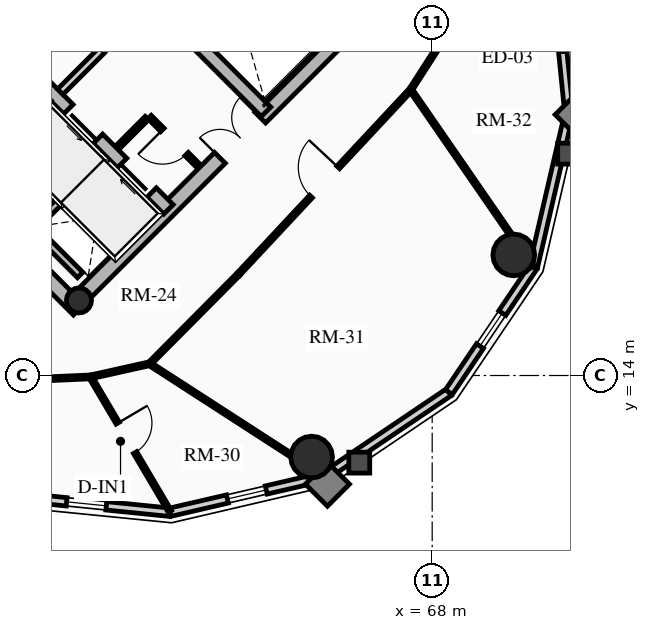
"""IFC4 building model, lengths in metres.
Left out: names, types, materials, properties, quantities, classifications, styles, units other than length and angle.
Written with IfcOpenShell. Run it as: python <this file> out.ifc"""

import sys

from ifc_helpers import new_model, si_unit, direction, frame, frame_2d, origin, origin_2d, place, context, subcontext, project, spatial, rectangle, circle, hollow_circle, extrude, source, transform, mapped, element, fill, save


model = new_model("IFC4")
c1 = context("Model", 3, precision=1e-05, world=origin(), true_north=direction((0.0, 1.0)))
c2 = subcontext(c1, "Body", "Model", "MODEL_VIEW")
j1 = project(units=[si_unit("LENGTHUNIT", "METRE"), si_unit("PLANEANGLEUNIT", "RADIAN")], contexts=[c1])
p1 = place(None, origin())
s1 = spatial("IfcSite", under=j1, at=p1, CompositionType="ELEMENT")
p2 = place(p1, origin())
s2 = spatial("IfcBuilding", under=s1, at=p2, CompositionType="ELEMENT")
p3 = place(p2, frame((0.0, 0.0, 232.45)))
s3 = spatial("IfcBuildingStorey", under=s2, at=p3, CompositionType="ELEMENT", Elevation=232.45)
p4 = place(p3, frame((58.702, 15.732, 0.0), z_axis=(0.0, 0.0, 1.0), x_axis=(-0.707106781187, 0.707106781187, 0.0)))
e1 = element("IfcWall", 1, at=p4, inside=s3, PredefinedType="SHEAR", context=c2, shape_type="SweptSolid", body=[
    extrude(rectangle(XDim=14.1, YDim=0.4, at=frame_2d((7.05, 0.0))), origin(), (0.0, 0.0, 1.0), 3.2),
])
p5 = place(p3, frame((58.561, 15.873, 0.0), z_axis=(0.0, 0.0, 1.0), x_axis=(0.707106781187, 0.707106781187, 0.0)))
e2 = element("IfcWall", 2, at=p5, inside=s3, PredefinedType="SHEAR", context=c2, shape_type="SweptSolid", body=[
    extrude(rectangle(XDim=10.7, YDim=0.4, at=frame_2d((5.35, 0.0))), origin(), (0.0, 0.0, 1.0), 3.2),
])
m1 = source(origin(), c2, "Body", "SweptSolid", [
    extrude(rectangle(XDim=1.5, YDim=2.02, at=frame_2d((0.75, 1.01))), frame((0.0, 0.21, 0.0), z_axis=(0.0, -1.0, 0.0), x_axis=(1.0, 0.0, 0.0)), (0.0, 0.0, 1.0), 0.42),
])
p6 = place(p5, frame((5.45, 0.0, 0.0)))
e3 = element("IfcOpeningElement", 3, at=p6, cuts=e2, PredefinedType="OPENING", context=c2, shape_type="MappedRepresentation", body=[
    mapped(m1, transform((0.0, 0.0, 0.0), x_axis=(1.0, 0.0, 0.0), y_axis=(0.0, 1.0, 0.0), z_axis=(0.0, 0.0, 1.0), scale=1.0)),
])
p7 = place(p3, frame((61.06, 18.373, 0.0), z_axis=(0.0, 0.0, 1.0), x_axis=(-0.707106781187, 0.707106781187, 0.0)))
e4 = element("IfcWall", 4, at=p7, inside=s3, PredefinedType="SHEAR", context=c2, shape_type="SweptSolid", body=[
    extrude(rectangle(XDim=13.7, YDim=0.35, at=frame_2d((6.85, 0.0))), origin(), (0.0, 0.0, 1.0), 3.2),
])
m2 = source(origin(), c2, "Body", "SweptSolid", [
    extrude(rectangle(XDim=1.1, YDim=2.015, at=frame_2d((0.55, 1.007))), frame((0.0, 0.185, 0.0), z_axis=(0.0, -1.0, 0.0), x_axis=(1.0, 0.0, 0.0)), (0.0, 0.0, 1.0), 0.37),
])
p8 = place(p7, frame((4.85, 0.0, 0.0)))
e5 = element("IfcOpeningElement", 5, at=p8, cuts=e4, PredefinedType="OPENING", context=c2, shape_type="MappedRepresentation", body=[
    mapped(m2, transform((0.0, 0.0, 0.0), x_axis=(1.0, 0.0, 0.0), y_axis=(0.0, 1.0, 0.0), z_axis=(0.0, 0.0, 1.0), scale=1.0)),
])
p9 = place(p7, frame((0.625, 0.0, 0.0)))
e6 = element("IfcOpeningElement", 6, at=p9, cuts=e4, PredefinedType="OPENING", context=c2, shape_type="MappedRepresentation", body=[
    mapped(m2, transform((0.0, 0.0, 0.0), x_axis=(1.0, 0.0, 0.0), y_axis=(0.0, 1.0, 0.0), z_axis=(0.0, 0.0, 1.0), scale=1.0)),
])
p10 = place(p7, frame((2.625, 0.0, 0.0)))
e7 = element("IfcOpeningElement", 7, at=p10, cuts=e4, PredefinedType="OPENING", context=c2, shape_type="MappedRepresentation", body=[
    mapped(m2, transform((0.0, 0.0, 0.0), x_axis=(1.0, 0.0, 0.0), y_axis=(0.0, 1.0, 0.0), z_axis=(0.0, 0.0, 1.0), scale=1.0)),
])
m3 = source(origin(), c2, "Body", "SweptSolid", [
    extrude(rectangle(XDim=1.15, YDim=2.02, at=frame_2d((0.575, 1.01))), frame((0.0, 0.185, 0.0), z_axis=(0.0, -1.0, 0.0), x_axis=(1.0, 0.0, 0.0)), (0.0, 0.0, 1.0), 0.37),
])
p11 = place(p7, frame((7.27, 0.0, 0.0)))
e8 = element("IfcOpeningElement", 8, at=p11, cuts=e4, PredefinedType="OPENING", context=c2, shape_type="MappedRepresentation", body=[
    mapped(m3, transform((0.0, 0.0, 0.0), x_axis=(1.0, 0.0, 0.0), y_axis=(0.0, 1.0, 0.0), z_axis=(0.0, 0.0, 1.0), scale=1.0)),
])
p12 = place(p3, frame((63.627, 20.94, 0.0), z_axis=(0.0, 0.0, 1.0), x_axis=(-0.707119496762, 0.707094065383, 0.0)))
e9 = element("IfcWall", 9, at=p12, inside=s3, PredefinedType="SHEAR", context=c2, shape_type="SweptSolid", body=[
    extrude(rectangle(XDim=9.6, YDim=0.35, at=frame_2d((4.8, 0.0))), origin(), (0.0, 0.0, 1.0), 3.2),
])
p13 = place(p12, frame((5.28, 0.0, 0.0)))
e10 = element("IfcOpeningElement", 10, at=p13, cuts=e9, PredefinedType="OPENING", context=c2, shape_type="MappedRepresentation", body=[
    mapped(m3, transform((0.0, 0.0, 0.0), x_axis=(1.0, 0.0, 0.0), y_axis=(0.0, 1.0, 0.0), z_axis=(0.0, 0.0, 1.0), scale=1.0)),
])
p14 = place(p3, frame((58.706, 15.976, 0.0), z_axis=(0.0, 0.0, 1.0), x_axis=(0.707106781187, 0.707106781187, 0.0)))
e11 = element("IfcColumn", 11, at=p14, inside=s3, PredefinedType="COLUMN", context=c2, shape_type="SweptSolid", body=[
    extrude(hollow_circle(Radius=0.33, WallThickness=0.025, at=origin_2d()), origin(), (0.0, 0.0, 1.0), 3.2),
])
for number, where, z_axis, x_axis in (
    (12, (64.827, 11.854, 0.0), (0.0, 0.0, 1.0), (1.0, 0.0, 0.0)),
    (13, (70.146, 17.173, 0.0), (0.0, 0.0, 1.0), (1.0, 0.0, 0.0)),
):
    element("IfcColumn", number, at=place(p3, frame(where, z_axis=z_axis, x_axis=x_axis)), inside=s3, PredefinedType="USERDEFINED", context=c2, shape_type="SweptSolid", body=[
        extrude(circle(Radius=0.55, at=origin_2d()), origin(), (0.0, 0.0, 1.0), 3.2),
    ])
p15 = place(p3, frame((61.1, 10.401, 0.0), z_axis=(0.0, 0.0, 1.0), x_axis=(-0.994929930991, 0.100570534541, 0.0)))
e14 = element("IfcWall", 14, at=p15, inside=s3, PredefinedType="SOLIDWALL", context=c2, shape_type="SweptSolid", body=[
    extrude(rectangle(XDim=4.418, YDim=0.22, at=frame_2d((2.209, 0.0))), origin(), (0.0, 0.0, 1.0), 2.402),
])
m4 = source(origin(), c2, "Body", "SweptSolid", [
    extrude(rectangle(XDim=1.05, YDim=1.3, at=frame_2d((0.525, 0.65))), frame((0.0, 0.12, 0.0), z_axis=(0.0, -1.0, 0.0), x_axis=(1.0, 0.0, 0.0)), (0.0, 0.0, 1.0), 0.24),
])
p16 = place(p15, frame((1.684, 0.0, 0.65)))
e15 = element("IfcOpeningElement", 15, at=p16, cuts=e14, PredefinedType="OPENING", context=c2, shape_type="MappedRepresentation", body=[
    mapped(m4, transform((0.0, 0.0, 0.0), x_axis=(1.0, 0.0, 0.0), y_axis=(0.0, 1.0, 0.0), z_axis=(0.0, 0.0, 1.0), scale=1.0)),
])
p17 = place(p3, frame((65.144, 11.337, 0.0), z_axis=(0.0, 0.0, 1.0), x_axis=(-0.974249228678, -0.225473813158, 0.0)))
e16 = element("IfcWall", 16, at=p17, inside=s3, PredefinedType="SOLIDWALL", context=c2, shape_type="SweptSolid", body=[
    extrude(rectangle(XDim=4.15, YDim=0.22, at=frame_2d((2.075, 0.0))), origin(), (0.0, 0.0, 1.0), 2.402),
])
p18 = place(p17, frame((1.55, 0.0, 0.65)))
e17 = element("IfcOpeningElement", 17, at=p18, cuts=e16, PredefinedType="OPENING", context=c2, shape_type="MappedRepresentation", body=[
    mapped(m4, transform((0.0, 0.0, 0.0), x_axis=(1.0, 0.0, 0.0), y_axis=(0.0, 1.0, 0.0), z_axis=(0.0, 0.0, 1.0), scale=1.0)),
])
p19 = place(p3, frame((68.439, 13.561, 0.0), z_axis=(0.0, 0.0, 1.0), x_axis=(-0.828833723692, -0.559495003079, 0.0)))
e18 = element("IfcWall", 18, at=p19, inside=s3, PredefinedType="SOLIDWALL", context=c2, shape_type="SweptSolid", body=[
    extrude(rectangle(XDim=3.976, YDim=0.22, at=frame_2d((1.988, 0.0))), origin(), (0.0, 0.0, 1.0), 2.402),
])
p20 = place(p3, frame((70.663, 16.856, 0.0), z_axis=(0.0, 0.0, 1.0), x_axis=(-0.559495003079, -0.828833723692, 0.0)))
e19 = element("IfcWall", 19, at=p20, inside=s3, PredefinedType="SOLIDWALL", context=c2, shape_type="SweptSolid", body=[
    extrude(rectangle(XDim=3.976, YDim=0.22, at=frame_2d((1.988, 0.0))), origin(), (0.0, 0.0, 1.0), 2.402),
])
p21 = place(p20, frame((1.463, 0.0, 0.65)))
e20 = element("IfcOpeningElement", 20, at=p21, cuts=e19, PredefinedType="OPENING", context=c2, shape_type="MappedRepresentation", body=[
    mapped(m4, transform((0.0, 0.0, 0.0), x_axis=(1.0, 0.0, 0.0), y_axis=(0.0, 1.0, 0.0), z_axis=(0.0, 0.0, 1.0), scale=1.0)),
])
p22 = place(p3, frame((71.599, 20.9, 0.0), z_axis=(0.0, 0.0, 1.0), x_axis=(-0.225473813158, -0.974249228678, 0.0)))
e21 = element("IfcWall", 21, at=p22, inside=s3, PredefinedType="SOLIDWALL", context=c2, shape_type="SweptSolid", body=[
    extrude(rectangle(XDim=4.15, YDim=0.22, at=frame_2d((2.075, 0.0))), origin(), (0.0, 0.0, 1.0), 2.402),
])
p23 = place(p3, frame((71.155, 25.295, 0.0), z_axis=(0.0, 0.0, 1.0), x_axis=(0.100570534541, -0.994929930991, 0.0)))
e22 = element("IfcWall", 22, at=p23, inside=s3, PredefinedType="SOLIDWALL", context=c2, shape_type="SweptSolid", body=[
    extrude(rectangle(XDim=4.418, YDim=0.22, at=frame_2d((2.209, 0.0))), origin(), (0.0, 0.0, 1.0), 2.402),
])
m5 = source(origin(), c2, "Body", "SweptSolid", [
    extrude(rectangle(XDim=1.15, YDim=2.005, at=frame_2d((0.575, 1.002))), frame((0.0, 0.12, 0.0), z_axis=(0.0, -1.0, 0.0), x_axis=(1.0, 0.0, 0.0)), (0.0, 0.0, 1.0), 0.24),
])
p24 = place(p23, frame((1.634, 0.0, 0.0)))
e23 = element("IfcOpeningElement", 23, at=p24, cuts=e22, PredefinedType="OPENING", context=c2, shape_type="MappedRepresentation", body=[
    mapped(m5, transform((0.0, 0.0, 0.0), x_axis=(1.0, 0.0, 0.0), y_axis=(0.0, 1.0, 0.0), z_axis=(0.0, 0.0, 1.0), scale=1.0)),
])
p25 = place(p3, frame((55.888, 19.069, 0.0), z_axis=(0.0, 0.0, 1.0), x_axis=(0.707106781187, 0.707106781187, 0.0)))
e24 = element("IfcWall", 24, at=p25, inside=s3, PredefinedType="SHEAR", context=c2, shape_type="SweptSolid", body=[
    extrude(rectangle(XDim=2.97, YDim=0.2, at=frame_2d((1.485, 0.0))), origin(), (0.0, 0.0, 1.0), 3.2),
])
p26 = place(p3, frame((57.284, 17.673, 0.0), z_axis=(0.0, 0.0, 1.0), x_axis=(0.707147878904, 0.70706568108, 0.0)))
e25 = element("IfcWall", 25, at=p26, inside=s3, PredefinedType="SHEAR", context=c2, shape_type="SweptSolid", body=[
    extrude(rectangle(XDim=2.97, YDim=0.2, at=frame_2d((1.485, 0.0))), origin(), (0.0, 0.0, 1.0), 3.2),
])
p27 = place(p3, frame((58.737, 16.644, 0.0), z_axis=(0.0, 0.0, 1.0), x_axis=(-0.707032117043, 0.707181437447, 0.0)))
e26 = element("IfcWall", 26, at=p27, inside=s3, PredefinedType="SHEAR", context=c2, shape_type="SweptSolid", body=[
    extrude(rectangle(XDim=1.635, YDim=0.2, at=frame_2d((0.817, 0.0))), origin(), (0.0, 0.0, 1.0), 3.2),
])
p28 = place(p3, frame((58.214, 21.467, 0.0), z_axis=(0.0, 0.0, 1.0), x_axis=(0.707106781187, 0.707106781187, 0.0)))
e27 = element("IfcWall", 27, at=p28, inside=s3, PredefinedType="PARTITIONING", context=c2, shape_type="SweptSolid", body=[
    extrude(rectangle(XDim=3.28, YDim=0.2, at=frame_2d((1.64, 0.0))), origin(), (0.0, 0.0, 1.0), 2.765),
])
m6 = source(origin(), c2, "Body", "SweptSolid", [
    extrude(rectangle(XDim=1.5, YDim=2.02, at=frame_2d((0.75, 1.01))), frame((0.0, 0.11, 0.0), z_axis=(0.0, -1.0, 0.0), x_axis=(1.0, 0.0, 0.0)), (0.0, 0.0, 1.0), 0.22),
])
p29 = place(p28, frame((1.55, 0.0, 0.0)))
e28 = element("IfcOpeningElement", 28, at=p29, cuts=e27, PredefinedType="OPENING", context=c2, shape_type="MappedRepresentation", body=[
    mapped(m6, transform((0.0, 0.0, 0.0), x_axis=(1.0, 0.0, 0.0), y_axis=(0.0, 1.0, 0.0), z_axis=(0.0, 0.0, 1.0), scale=1.0)),
])
p30 = place(p3, frame((61.835, 19.529, 0.0), z_axis=(0.0, 0.0, 1.0), x_axis=(-0.707174592913, 0.707038962956, 0.0)))
e29 = element("IfcWall", 29, at=p30, inside=s3, PredefinedType="PARTITIONING", context=c2, shape_type="SweptSolid", body=[
    extrude(rectangle(XDim=1.8, YDim=0.125, at=frame_2d((0.9, 0.0))), origin(), (0.0, 0.0, 1.0), 2.765),
])
m7 = source(origin(), c2, "Body", "SweptSolid", [
    extrude(rectangle(XDim=0.9, YDim=2.005, at=frame_2d((0.45, 1.002))), frame((0.0, 0.073, 0.0), z_axis=(0.0, -1.0, 0.0), x_axis=(1.0, 0.0, 0.0)), (0.0, 0.0, 1.0), 0.145),
])
p31 = place(p30, frame((0.42, 0.0, 0.0)))
e30 = element("IfcOpeningElement", 30, at=p31, cuts=e29, PredefinedType="OPENING", context=c2, shape_type="MappedRepresentation", body=[
    mapped(m7, transform((0.0, 0.0, 0.0), x_axis=(1.0, 0.0, 0.0), y_axis=(0.0, 1.0, 0.0), z_axis=(0.0, 0.0, 1.0), scale=1.0)),
])
p32 = place(p3, frame((59.713, 19.996, 0.0), z_axis=(0.0, 0.0, 1.0), x_axis=(0.707217726, 0.706995818963, 0.0)))
e31 = element("IfcWall", 31, at=p32, inside=s3, PredefinedType="PARTITIONING", context=c2, shape_type="SweptSolid", body=[
    extrude(rectangle(XDim=1.1, YDim=0.125, at=frame_2d((0.55, 0.0))), origin(), (0.0, 0.0, 1.0), 2.765),
])
p33 = place(p3, frame((57.511, 13.897, 0.0), z_axis=(0.0, 0.0, 1.0), x_axis=(0.999024538494, 0.044158481476, 0.0)))
e32 = element("IfcWall", 32, at=p33, inside=s3, PredefinedType="MOVABLE", context=c2, shape_type="SweptSolid", body=[
    extrude(rectangle(XDim=1.498, YDim=0.1, at=frame_2d((0.749, 0.0))), origin(), (0.0, 0.0, 1.0), 2.402),
])
p34 = place(p3, frame((59.008, 13.963, 0.0), z_axis=(0.0, 0.0, 1.0), x_axis=(0.976020856791, 0.21767702476, 0.0)))
e33 = element("IfcWall", 33, at=p34, inside=s3, PredefinedType="MOVABLE", context=c2, shape_type="SweptSolid", body=[
    extrude(rectangle(XDim=1.593, YDim=0.1, at=frame_2d((0.796, 0.0))), origin(), (0.0, 0.0, 1.0), 2.335),
])
p35 = place(p3, frame((60.562, 14.31, 0.0), z_axis=(0.0, 0.0, 1.0), x_axis=(0.704566236161, 0.709638230975, 0.0)))
e34 = element("IfcWall", 34, at=p35, inside=s3, PredefinedType="MOVABLE", context=c2, shape_type="SweptSolid", body=[
    extrude(rectangle(XDim=3.321, YDim=0.1, at=frame_2d((1.661, 0.0))), origin(), (0.0, 0.0, 1.0), 2.402),
])
p36 = place(p3, frame((62.903, 16.667, 0.0), z_axis=(0.0, 0.0, 1.0), x_axis=(0.682371947497, 0.731005147225, 0.0)))
e35 = element("IfcWall", 35, at=p36, inside=s3, PredefinedType="MOVABLE", context=c2, shape_type="SweptSolid", body=[
    extrude(rectangle(XDim=6.642, YDim=0.1, at=frame_2d((3.321, 0.0))), origin(), (0.0, 0.0, 1.0), 2.335),
])
m8 = source(origin(), c2, "Body", "SweptSolid", [
    extrude(rectangle(XDim=1.05, YDim=2.015, at=frame_2d((0.525, 1.007))), frame((0.0, 0.06, 0.0), z_axis=(0.0, -1.0, 0.0), x_axis=(1.0, 0.0, 0.0)), (0.0, 0.0, 1.0), 0.12),
])
p37 = place(p36, frame((2.796, 0.0, 0.0)))
e36 = element("IfcOpeningElement", 36, at=p37, cuts=e35, PredefinedType="OPENING", context=c2, shape_type="MappedRepresentation", body=[
    mapped(m8, transform((0.0, 0.0, 0.0), x_axis=(1.0, 0.0, 0.0), y_axis=(0.0, 1.0, 0.0), z_axis=(0.0, 0.0, 1.0), scale=1.0)),
])
p38 = place(p3, frame((67.435, 21.521, 0.0), z_axis=(0.0, 0.0, 1.0), x_axis=(0.540777197838, 0.841165870859, 0.0)))
e37 = element("IfcWall", 37, at=p38, inside=s3, PredefinedType="MOVABLE", context=c2, shape_type="SweptSolid", body=[
    extrude(rectangle(XDim=1.888, YDim=0.1, at=frame_2d((0.944, 0.0))), origin(), (0.0, 0.0, 1.0), 2.335),
])
p39 = place(p3, frame((60.562, 14.31, 0.0), z_axis=(0.0, 0.0, 1.0), x_axis=(0.839858797161, -0.542804938105, 0.0)))
e38 = element("IfcWall", 38, at=p39, inside=s3, PredefinedType="MOVABLE", context=c2, shape_type="SweptSolid", body=[
    extrude(rectangle(XDim=5.444, YDim=0.1, at=frame_2d((2.722, 0.0))), origin(), (0.0, 0.0, 1.0), 2.402),
])
p40 = place(p3, frame((67.435, 21.521, 0.0), z_axis=(0.0, 0.0, 1.0), x_axis=(0.567700677576, -0.823235045828, 0.0)))
e39 = element("IfcWall", 39, at=p40, inside=s3, PredefinedType="MOVABLE", context=c2, shape_type="SweptSolid", body=[
    extrude(rectangle(XDim=5.656, YDim=0.1, at=frame_2d((2.828, 0.0))), origin(), (0.0, 0.0, 1.0), 2.402),
])
p41 = place(p3, frame((59.008, 13.963, 0.0), z_axis=(0.0, 0.0, 1.0), x_axis=(0.508047134864, -0.86132926849, 0.0)))
e40 = element("IfcWall", 40, at=p41, inside=s3, PredefinedType="MOVABLE", context=c2, shape_type="SweptSolid", body=[
    extrude(rectangle(XDim=4.113, YDim=0.1, at=frame_2d((2.056, 0.0))), origin(), (0.0, 0.0, 1.0), 2.335),
])
m9 = source(origin(), c2, "Body", "SweptSolid", [
    extrude(rectangle(XDim=0.9, YDim=2.005, at=frame_2d((0.45, 1.002))), frame((0.0, 0.06, 0.0), z_axis=(0.0, -1.0, 0.0), x_axis=(1.0, 0.0, 0.0)), (0.0, 0.0, 1.0), 0.12),
])
p42 = place(p41, frame((1.413, 0.0, 0.0)))
e41 = element("IfcOpeningElement", 41, at=p42, cuts=e40, PredefinedType="OPENING", context=c2, shape_type="MappedRepresentation", body=[
    mapped(m9, transform((0.0, 0.0, 0.0), x_axis=(1.0, 0.0, 0.0), y_axis=(0.0, 1.0, 0.0), z_axis=(0.0, 0.0, 1.0), scale=1.0)),
])
m10 = source(origin(), c2, "Body", "SweptSolid", [
    extrude(rectangle(XDim=1.05, YDim=1.3, at=frame_2d((0.525, 0.65))), frame((0.0, 0.03, 0.0), z_axis=(0.0, -1.0, 0.0), x_axis=(1.0, 0.0, 0.0)), (0.0, 0.0, 1.0), 0.06),
])
p43 = place(p16, origin())
e42 = element("IfcWindow", 42, at=p43, inside=s3, PartitioningType="SINGLE_PANEL", PredefinedType="WINDOW", context=c2, shape_type="MappedRepresentation", body=[
    mapped(m10, transform((0.0, 0.0, 0.0), x_axis=(1.0, 0.0, 0.0), y_axis=(0.0, 1.0, 0.0), z_axis=(0.0, 0.0, 1.0), scale=1.0)),
])
fill(e15, e42)
p44 = place(p18, origin())
e43 = element("IfcWindow", 43, at=p44, inside=s3, PartitioningType="SINGLE_PANEL", PredefinedType="WINDOW", context=c2, shape_type="MappedRepresentation", body=[
    mapped(m10, transform((0.0, 0.0, 0.0), x_axis=(1.0, 0.0, 0.0), y_axis=(0.0, 1.0, 0.0), z_axis=(0.0, 0.0, 1.0), scale=1.0)),
])
fill(e17, e43)
p45 = place(p21, origin())
e44 = element("IfcWindow", 44, at=p45, inside=s3, PartitioningType="SINGLE_PANEL", PredefinedType="WINDOW", context=c2, shape_type="MappedRepresentation", body=[
    mapped(m10, transform((0.0, 0.0, 0.0), x_axis=(1.0, 0.0, 0.0), y_axis=(0.0, 1.0, 0.0), z_axis=(0.0, 0.0, 1.0), scale=1.0)),
])
fill(e20, e44)
m11 = source(origin(), c2, "Body", "SweptSolid", [
    extrude(rectangle(XDim=1.1, YDim=2.015, at=frame_2d((0.55, 1.007))), frame((0.0, 0.025, 0.0), z_axis=(0.0, -1.0, 0.0), x_axis=(1.0, 0.0, 0.0)), (0.0, 0.0, 1.0), 0.05),
])
p46 = place(p9, origin())
e45 = element("IfcDoor", 45, at=p46, inside=s3, OperationType="SLIDING_TO_RIGHT", PredefinedType="DOOR", context=c2, shape_type="MappedRepresentation", body=[
    mapped(m11, transform((0.0, 0.0, 0.0), x_axis=(1.0, 0.0, 0.0), y_axis=(0.0, 1.0, 0.0), z_axis=(0.0, 0.0, 1.0), scale=1.0)),
])
fill(e6, e45)
p47 = place(p10, origin())
e46 = element("IfcDoor", 46, at=p47, inside=s3, OperationType="SLIDING_TO_LEFT", PredefinedType="DOOR", context=c2, shape_type="MappedRepresentation", body=[
    mapped(m11, transform((0.0, 0.0, 0.0), x_axis=(1.0, 0.0, 0.0), y_axis=(0.0, 1.0, 0.0), z_axis=(0.0, 0.0, 1.0), scale=1.0)),
])
fill(e7, e46)
m12 = source(origin(), c2, "Body", "SweptSolid", [
    extrude(rectangle(XDim=1.5, YDim=2.02, at=frame_2d((0.75, 1.01))), frame((0.0, 0.025, 0.0), z_axis=(0.0, -1.0, 0.0), x_axis=(1.0, 0.0, 0.0)), (0.0, 0.0, 1.0), 0.05),
])
p48 = place(p6, origin())
e47 = element("IfcDoor", 47, at=p48, inside=s3, OperationType="DOUBLE_DOOR_SINGLE_SWING", PredefinedType="DOOR", context=c2, shape_type="MappedRepresentation", body=[
    mapped(m12, transform((0.0, 0.0, 0.0), x_axis=(1.0, 0.0, 0.0), y_axis=(0.0, 1.0, 0.0), z_axis=(0.0, 0.0, 1.0), scale=1.0)),
])
fill(e3, e47)
m13 = source(origin(), c2, "Body", "SweptSolid", [
    extrude(rectangle(XDim=0.9, YDim=2.005, at=frame_2d((0.45, 1.002))), frame((0.0, 0.025, 0.0), z_axis=(0.0, -1.0, 0.0), x_axis=(1.0, 0.0, 0.0)), (0.0, 0.0, 1.0), 0.05),
])
p49 = place(p31, origin())
e48 = element("IfcDoor", 48, at=p49, inside=s3, OperationType="SINGLE_SWING_RIGHT", PredefinedType="DOOR", context=c2, shape_type="MappedRepresentation", body=[
    mapped(m13, transform((0.0, 0.0, 0.0), x_axis=(1.0, 0.0, 0.0), y_axis=(0.0, 1.0, 0.0), z_axis=(0.0, 0.0, 1.0), scale=1.0)),
])
fill(e30, e48)
p50 = place(p42, origin())
e49 = element("IfcDoor", 49, at=p50, inside=s3, OperationType="SINGLE_SWING_LEFT", PredefinedType="DOOR", context=c2, shape_type="MappedRepresentation", body=[
    mapped(m13, transform((0.0, 0.0, 0.0), x_axis=(1.0, 0.0, 0.0), y_axis=(0.0, 1.0, 0.0), z_axis=(0.0, 0.0, 1.0), scale=1.0)),
])
fill(e41, e49)
m14 = source(origin(), c2, "Body", "SweptSolid", [
    extrude(rectangle(XDim=1.05, YDim=2.015, at=frame_2d((0.525, 1.007))), frame((0.0, 0.025, 0.0), z_axis=(0.0, -1.0, 0.0), x_axis=(1.0, 0.0, 0.0)), (0.0, 0.0, 1.0), 0.05),
])
p51 = place(p37, origin())
e50 = element("IfcDoor", 50, at=p51, inside=s3, OperationType="SINGLE_SWING_RIGHT", PredefinedType="DOOR", context=c2, shape_type="MappedRepresentation", body=[
    mapped(m14, transform((0.0, 0.0, 0.0), x_axis=(1.0, 0.0, 0.0), y_axis=(0.0, 1.0, 0.0), z_axis=(0.0, 0.0, 1.0), scale=1.0)),
])
fill(e36, e50)
save(model, sys.argv[1])
